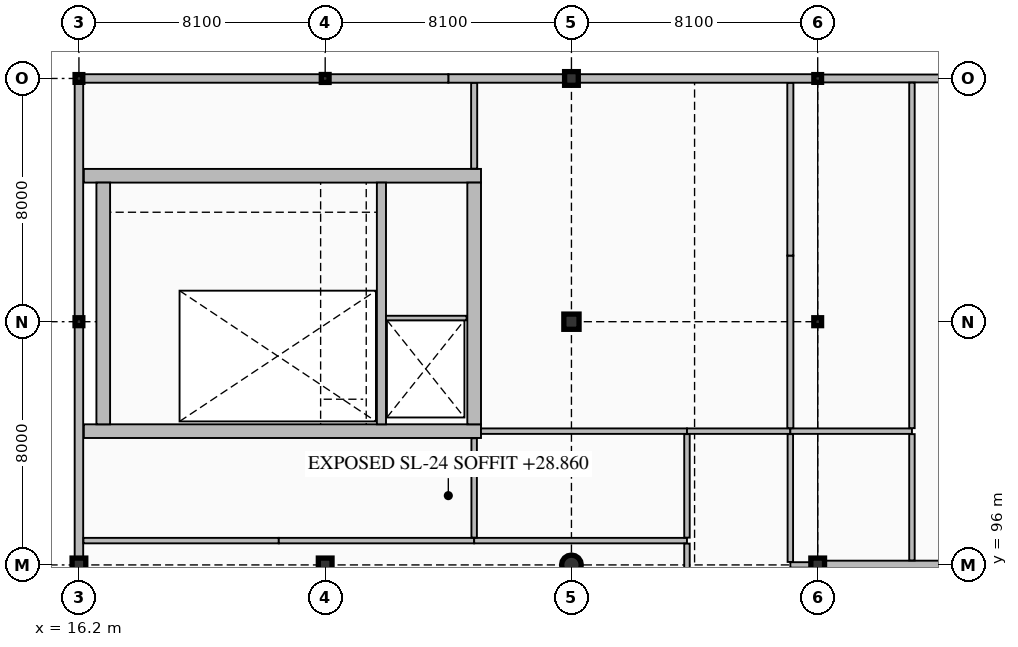
"""IFC4 building model, lengths in metres.
Left out: names, types, materials, properties, quantities, classifications, styles, units other than length and angle.
Written with IfcOpenShell. Run it as: python <this file> out.ifc"""

import sys

from ifc_helpers import new_model, si_unit, direction, frame, frame_2d, origin, origin_2d, place, context, subcontext, project, spatial, rectangle, hollow_rectangle, circle, i_section, extrude, element, fill, save


model = new_model("IFC4")
c1 = context("Model", 3, precision=1e-05, world=origin(), true_north=direction((0.0, 1.0)))
c2 = subcontext(c1, "Body", "Model", "MODEL_VIEW")
j1 = project(units=[si_unit("LENGTHUNIT", "METRE"), si_unit("PLANEANGLEUNIT", "RADIAN")], contexts=[c1])
p1 = place(None, origin())
s1 = spatial("IfcSite", under=j1, at=p1, CompositionType="ELEMENT")
p2 = place(p1, origin())
s2 = spatial("IfcBuilding", under=s1, at=p2, CompositionType="ELEMENT")
p3 = place(p2, frame((0.0, 0.0, 24.9)))
s3 = spatial("IfcBuildingStorey", under=s2, at=p3, CompositionType="ELEMENT", Elevation=24.9)
p4 = place(p3, frame((16.36, 100.4, 0.0), z_axis=(0.0, 0.0, 1.0), x_axis=(1.0, 0.0, 0.0)))
e1 = element("IfcWall", 1, at=p4, inside=s3, PredefinedType="SHEAR", context=c2, shape_type="SweptSolid", body=[
    extrude(rectangle(XDim=13.065, YDim=0.45, at=frame_2d((6.532, 0.0))), origin(), (0.0, 0.0, 1.0), 4.2),
])
p5 = place(p4, frame((1.39, 0.0, 0.0)))
e2 = element("IfcOpeningElement", 2, at=p5, cuts=e1, PredefinedType="OPENING", context=c2, shape_type="SweptSolid", body=[
    extrude(rectangle(XDim=1.15, YDim=2.25, at=frame_2d((0.575, 1.125))), frame((0.0, 0.235, 0.0), z_axis=(0.0, -1.0, 0.0), x_axis=(1.0, 0.0, 0.0)), (0.0, 0.0, 1.0), 0.47),
])
p6 = place(p4, frame((10.695, 0.0, 0.0)))
e3 = element("IfcOpeningElement", 3, at=p6, cuts=e1, PredefinedType="OPENING", context=c2, shape_type="SweptSolid", body=[
    extrude(rectangle(XDim=1.1, YDim=2.2, at=frame_2d((0.55, 1.1))), frame((0.0, 0.235, 0.0), z_axis=(0.0, -1.0, 0.0), x_axis=(1.0, 0.0, 0.0)), (0.0, 0.0, 1.0), 0.47),
])
p7 = place(p3, frame((16.36, 108.8, 0.0), z_axis=(0.0, 0.0, 1.0), x_axis=(1.0, 0.0, 0.0)))
e4 = element("IfcWall", 4, at=p7, inside=s3, PredefinedType="SHEAR", context=c2, shape_type="SweptSolid", body=[
    extrude(rectangle(XDim=13.065, YDim=0.45, at=frame_2d((6.532, 0.0))), origin(), (0.0, 0.0, 1.0), 4.2),
])
for number, where, z_axis, x_axis in (
    (5, (17.0, 100.625, 0.0), (0.0, 0.0, 1.0), (0.0, 1.0, 0.0)),
    (6, (29.2, 100.625, 0.0), (0.0, 0.0, 1.0), (0.0, 1.0, 0.0)),
):
    element("IfcWall", number, at=place(p3, frame(where, z_axis=z_axis, x_axis=x_axis)), inside=s3, PredefinedType="SHEAR", context=c2, shape_type="SweptSolid", body=[
        extrude(rectangle(XDim=7.95, YDim=0.45, at=frame_2d((3.975, 0.0))), origin(), (0.0, 0.0, 1.0), 4.2),
    ])
p8 = place(p3, frame((26.15, 100.625, 0.0), z_axis=(0.0, 0.0, 1.0), x_axis=(0.0, 1.0, 0.0)))
e7 = element("IfcWall", 7, at=p8, inside=s3, PredefinedType="SHEAR", context=c2, shape_type="SweptSolid", body=[
    extrude(rectangle(XDim=7.95, YDim=0.3, at=frame_2d((3.975, 0.0))), origin(), (0.0, 0.0, 1.0), 4.2),
])
p9 = place(p3, frame((16.2, 96.0, 0.0), z_axis=(0.0, 0.0, 1.0), x_axis=(1.0, 0.0, 0.0)))
e8 = element("IfcColumn", 8, at=p9, inside=s3, PredefinedType="COLUMN", context=c2, shape_type="SweptSolid", body=[
    extrude(rectangle(XDim=0.45, YDim=0.45, at=origin_2d()), origin(), (0.0, 0.0, 1.0), 4.2),
])
p10 = place(p3, frame((16.2, 104.0, 0.0), z_axis=(0.0, 0.0, 1.0), x_axis=(1.0, 0.0, 0.0)))
e9 = element("IfcColumn", 9, at=p10, inside=s3, PredefinedType="COLUMN", context=c2, shape_type="SweptSolid", body=[
    extrude(i_section(OverallWidth=0.256, OverallDepth=0.26, WebThickness=0.011, FlangeThickness=0.017, FilletRadius=0.013, at=origin_2d()), origin(), (0.0, 0.0, 1.0), 4.2),
])
p11 = place(p3, frame((16.2, 112.0, 0.0), z_axis=(0.0, 0.0, 1.0), x_axis=(1.0, 0.0, 0.0)))
e10 = element("IfcColumn", 10, at=p11, inside=s3, PredefinedType="COLUMN", context=c2, shape_type="SweptSolid", body=[
    extrude(hollow_rectangle(XDim=0.254, YDim=0.254, WallThickness=0.013, InnerFilletRadius=0.013, OuterFilletRadius=0.025, at=origin_2d()), origin(), (0.0, 0.0, 1.0), 4.2),
])
p12 = place(p3, frame((24.3, 96.0, 0.0), z_axis=(0.0, 0.0, 1.0), x_axis=(1.0, 0.0, 0.0)))
e11 = element("IfcColumn", 11, at=p12, inside=s3, PredefinedType="COLUMN", context=c2, shape_type="SweptSolid", body=[
    extrude(rectangle(XDim=0.45, YDim=0.45, at=origin_2d()), origin(), (0.0, 0.0, 1.0), 4.2),
])
p13 = place(p3, frame((24.3, 112.0, 0.0), z_axis=(0.0, 0.0, 1.0), x_axis=(1.0, 0.0, 0.0)))
e12 = element("IfcColumn", 12, at=p13, inside=s3, PredefinedType="COLUMN", context=c2, shape_type="SweptSolid", body=[
    extrude(i_section(OverallWidth=0.256, OverallDepth=0.26, WebThickness=0.011, FlangeThickness=0.017, FilletRadius=0.013, at=origin_2d()), origin(), (0.0, 0.0, 1.0), 4.2),
])
p14 = place(p3, frame((32.4, 96.0, 0.0), z_axis=(0.0, 0.0, 1.0), x_axis=(1.0, 0.0, 0.0)))
e13 = element("IfcColumn", 13, at=p14, inside=s3, PredefinedType="COLUMN", context=c2, shape_type="SweptSolid", body=[
    extrude(circle(Radius=0.325, at=origin_2d()), origin(), (0.0, 0.0, 1.0), 4.2),
])
p15 = place(p3, frame((32.4, 104.0, 0.0), z_axis=(0.0, 0.0, 1.0), x_axis=(1.0, 0.0, 0.0)))
e14 = element("IfcColumn", 14, at=p15, inside=s3, PredefinedType="COLUMN", context=c2, shape_type="SweptSolid", body=[
    extrude(rectangle(XDim=0.5, YDim=0.5, at=origin_2d()), origin(), (0.0, 0.0, 1.0), 4.2),
])
for number, where, z_axis, x_axis in (
    (15, (32.4, 112.0, 0.0), (0.0, 0.0, 1.0), (1.0, 0.0, 0.0)),
    (16, (40.5, 96.0, 0.0), (0.0, 0.0, 1.0), (1.0, 0.0, 0.0)),
):
    element("IfcColumn", number, at=place(p3, frame(where, z_axis=z_axis, x_axis=x_axis)), inside=s3, PredefinedType="COLUMN", context=c2, shape_type="SweptSolid", body=[
        extrude(rectangle(XDim=0.45, YDim=0.45, at=origin_2d()), origin(), (0.0, 0.0, 1.0), 4.2),
    ])
p16 = place(p3, frame((40.5, 104.0, 0.0), z_axis=(0.0, 0.0, 1.0), x_axis=(1.0, 0.0, 0.0)))
e17 = element("IfcColumn", 17, at=p16, inside=s3, PredefinedType="COLUMN", context=c2, shape_type="SweptSolid", body=[
    extrude(i_section(OverallWidth=0.256, OverallDepth=0.26, WebThickness=0.011, FlangeThickness=0.017, FilletRadius=0.013, at=origin_2d()), origin(), (0.0, 0.0, 1.0), 4.2),
])
p17 = place(p3, frame((40.5, 112.0, 0.0), z_axis=(0.0, 0.0, 1.0), x_axis=(1.0, 0.0, 0.0)))
e18 = element("IfcColumn", 18, at=p17, inside=s3, PredefinedType="COLUMN", context=c2, shape_type="SweptSolid", body=[
    extrude(hollow_rectangle(XDim=0.254, YDim=0.254, WallThickness=0.013, InnerFilletRadius=0.013, OuterFilletRadius=0.025, at=origin_2d()), origin(), (0.0, 0.0, 1.0), 4.2),
])
p18 = place(p3, frame((40.68, 96.0, 0.0), z_axis=(0.0, 0.0, 1.0), x_axis=(1.0, 0.0, 0.0)))
e19 = element("IfcWall", 19, at=p18, inside=s3, PredefinedType="SOLIDWALL", context=c2, shape_type="SweptSolid", body=[
    extrude(rectangle(XDim=5.52, YDim=0.28, at=frame_2d((2.76, 0.0))), origin(), (0.0, 0.0, 1.0), 3.402),
])
p19 = place(p3, frame((46.2, 112.0, 0.0), z_axis=(0.0, 0.0, 1.0), x_axis=(-1.0, 0.0, 0.0)))
e20 = element("IfcWall", 20, at=p19, inside=s3, PredefinedType="SOLIDWALL", context=c2, shape_type="SweptSolid", body=[
    extrude(rectangle(XDim=5.7, YDim=0.26, at=frame_2d((2.85, 0.0))), origin(), (0.0, 0.0, 1.0), 3.489),
])
p20 = place(p19, frame((3.6, 0.0, 0.95)))
e21 = element("IfcOpeningElement", 21, at=p20, cuts=e20, PredefinedType="OPENING", context=c2, shape_type="SweptSolid", body=[
    extrude(rectangle(XDim=0.6, YDim=1.8, at=frame_2d((0.3, 0.9))), frame((0.0, 0.14, 0.0), z_axis=(0.0, -1.0, 0.0), x_axis=(1.0, 0.0, 0.0)), (0.0, 0.0, 1.0), 0.28),
])
p21 = place(p3, frame((40.5, 112.0, 0.0), z_axis=(0.0, 0.0, 1.0), x_axis=(-1.0, 0.0, 0.0)))
e22 = element("IfcWall", 22, at=p21, inside=s3, PredefinedType="SOLIDWALL", context=c2, shape_type="SweptSolid", body=[
    extrude(rectangle(XDim=12.15, YDim=0.28, at=frame_2d((6.075, 0.0))), origin(), (0.0, 0.0, 1.0), 3.402),
])
p22 = place(p21, frame((5.85, 0.0, 0.85)))
e23 = element("IfcOpeningElement", 23, at=p22, cuts=e22, PredefinedType="OPENING", context=c2, shape_type="SweptSolid", body=[
    extrude(rectangle(XDim=0.75, YDim=2.2, at=frame_2d((0.375, 1.1))), frame((0.0, 0.15, 0.0), z_axis=(0.0, -1.0, 0.0), x_axis=(1.0, 0.0, 0.0)), (0.0, 0.0, 1.0), 0.3),
])
p23 = place(p3, frame((28.35, 112.0, 0.0), z_axis=(0.0, 0.0, 1.0), x_axis=(-1.0, 0.0, 0.0)))
e24 = element("IfcWall", 24, at=p23, inside=s3, PredefinedType="SOLIDWALL", context=c2, shape_type="SweptSolid", body=[
    extrude(rectangle(XDim=12.15, YDim=0.28, at=frame_2d((6.075, 0.0))), origin(), (0.0, 0.0, 1.0), 3.402),
])
p24 = place(p23, frame((6.75, 0.0, 0.95)))
e25 = element("IfcOpeningElement", 25, at=p24, cuts=e24, PredefinedType="OPENING", context=c2, shape_type="SweptSolid", body=[
    extrude(rectangle(XDim=2.7, YDim=0.9, at=frame_2d((1.35, 0.45))), frame((0.0, 0.15, 0.0), z_axis=(0.0, -1.0, 0.0), x_axis=(1.0, 0.0, 0.0)), (0.0, 0.0, 1.0), 0.3),
])
p25 = place(p3, frame((16.2, 112.0, 0.0), z_axis=(0.0, 0.0, 1.0), x_axis=(0.0, -1.0, 0.0)))
e26 = element("IfcWall", 26, at=p25, inside=s3, PredefinedType="SOLIDWALL", context=c2, shape_type="SweptSolid", body=[
    extrude(rectangle(XDim=16.0, YDim=0.28, at=frame_2d((8.0, 0.0))), origin(), (0.0, 0.0, 1.0), 3.452),
])
p26 = place(p3, frame((16.2, 96.0, 0.0), z_axis=(0.0, 0.0, 1.0), x_axis=(0.0, -1.0, 0.0)))
e27 = element("IfcWall", 27, at=p26, inside=s3, PredefinedType="SOLIDWALL", context=c2, shape_type="SweptSolid", body=[
    extrude(rectangle(XDim=16.0, YDim=0.28, at=frame_2d((8.0, 0.0))), origin(), (0.0, 0.0, 1.0), 3.489),
])
p27 = place(p3, frame((26.3, 104.12, 0.0), z_axis=(0.0, 0.0, 1.0), x_axis=(1.0, 0.0, 0.0)))
e28 = element("IfcWall", 28, at=p27, inside=s3, PredefinedType="PARTITIONING", context=c2, shape_type="SweptSolid", body=[
    extrude(rectangle(XDim=2.65, YDim=0.15, at=frame_2d((1.325, 0.0))), origin(), (0.0, 0.0, 1.0), 3.96),
])
for number, where, z_axis, x_axis in (
    (29, (16.348, 96.8, 0.0), (0.0, 0.0, 1.0), (1.0, 0.0, 0.0)),
    (30, (22.774, 96.8, 0.0), (0.0, 0.0, 1.0), (1.0, 0.0, 0.0)),
):
    element("IfcWall", number, at=place(p3, frame(where, z_axis=z_axis, x_axis=x_axis)), inside=s3, PredefinedType="PARTITIONING", context=c2, shape_type="SweptSolid", body=[
        extrude(rectangle(XDim=6.426, YDim=0.18, at=frame_2d((3.213, 0.0))), origin(), (0.0, 0.0, 1.0), 3.96),
    ])
p28 = place(p3, frame((29.2, 96.8, 0.0), z_axis=(0.0, 0.0, 1.0), x_axis=(1.0, 0.0, 0.0)))
e31 = element("IfcWall", 31, at=p28, inside=s3, PredefinedType="PARTITIONING", context=c2, shape_type="SweptSolid", body=[
    extrude(rectangle(XDim=7.0, YDim=0.18, at=frame_2d((3.5, 0.0))), origin(), (0.0, 0.0, 1.0), 3.96),
])
p29 = place(p3, frame((29.425, 100.4, 0.0), z_axis=(0.0, 0.0, 1.0), x_axis=(1.0, 0.0, 0.0)))
e32 = element("IfcWall", 32, at=p29, inside=s3, PredefinedType="PARTITIONING", context=c2, shape_type="SweptSolid", body=[
    extrude(rectangle(XDim=6.775, YDim=0.18, at=frame_2d((3.387, 0.0))), origin(), (0.0, 0.0, 1.0), 3.96),
])
p30 = place(p29, frame((2.913, 0.0, 0.0)))
e33 = element("IfcOpeningElement", 33, at=p30, cuts=e32, PredefinedType="OPENING", context=c2, shape_type="SweptSolid", body=[
    extrude(rectangle(XDim=0.95, YDim=2.15, at=frame_2d((0.475, 1.075))), frame((0.0, 0.1, 0.0), z_axis=(0.0, -1.0, 0.0), x_axis=(1.0, 0.0, 0.0)), (0.0, 0.0, 1.0), 0.2),
])
p31 = place(p3, frame((36.2, 100.4, 0.0), z_axis=(0.0, 0.0, 1.0), x_axis=(1.0, 0.0, 0.0)))
e34 = element("IfcWall", 34, at=p31, inside=s3, PredefinedType="PARTITIONING", context=c2, shape_type="SweptSolid", body=[
    extrude(rectangle(XDim=3.4, YDim=0.18, at=frame_2d((1.7, 0.0))), origin(), (0.0, 0.0, 1.0), 3.96),
])
p32 = place(p3, frame((39.6, 96.0, 0.0), z_axis=(0.0, 0.0, 1.0), x_axis=(1.0, 0.0, 0.0)))
e35 = element("IfcWall", 35, at=p32, inside=s3, PredefinedType="PARTITIONING", context=c2, shape_type="SweptSolid", body=[
    extrude(rectangle(XDim=0.667, YDim=0.18, at=frame_2d((0.333, 0.0))), origin(), (0.0, 0.0, 1.0), 3.489),
])
p33 = place(p3, frame((39.6, 100.4, 0.0), z_axis=(0.0, 0.0, 1.0), x_axis=(1.0, 0.0, 0.0)))
e36 = element("IfcWall", 36, at=p33, inside=s3, PredefinedType="PARTITIONING", context=c2, shape_type="SweptSolid", body=[
    extrude(rectangle(XDim=4.0, YDim=0.18, at=frame_2d((2.0, 0.0))), origin(), (0.0, 0.0, 1.0), 3.96),
])
p34 = place(p3, frame((29.2, 96.898, 0.0), z_axis=(0.0, 0.0, 1.0), x_axis=(0.0, 1.0, 0.0)))
e37 = element("IfcWall", 37, at=p34, inside=s3, PredefinedType="PARTITIONING", context=c2, shape_type="SweptSolid", body=[
    extrude(rectangle(XDim=3.269, YDim=0.18, at=frame_2d((1.635, 0.0))), origin(), (0.0, 0.0, 1.0), 3.96),
])
p35 = place(p34, frame((1.034, 0.0, 0.0)))
e38 = element("IfcOpeningElement", 38, at=p35, cuts=e37, PredefinedType="OPENING", context=c2, shape_type="SweptSolid", body=[
    extrude(rectangle(XDim=1.2, YDim=2.2, at=frame_2d((0.6, 1.1))), frame((0.0, 0.1, 0.0), z_axis=(0.0, -1.0, 0.0), x_axis=(1.0, 0.0, 0.0)), (0.0, 0.0, 1.0), 0.2),
])
p36 = place(p3, frame((29.2, 109.033, 0.0), z_axis=(0.0, 0.0, 1.0), x_axis=(0.0, 1.0, 0.0)))
e39 = element("IfcWall", 39, at=p36, inside=s3, PredefinedType="PARTITIONING", context=c2, shape_type="SweptSolid", body=[
    extrude(rectangle(XDim=2.819, YDim=0.2, at=frame_2d((1.41, 0.0))), origin(), (0.0, 0.0, 1.0), 3.96),
])
p37 = place(p36, frame((0.909, 0.0, 0.0)))
e40 = element("IfcOpeningElement", 40, at=p37, cuts=e39, PredefinedType="OPENING", context=c2, shape_type="SweptSolid", body=[
    extrude(rectangle(XDim=1.0, YDim=2.2, at=frame_2d((0.5, 1.1))), frame((0.0, 0.11, 0.0), z_axis=(0.0, -1.0, 0.0), x_axis=(1.0, 0.0, 0.0)), (0.0, 0.0, 1.0), 0.22),
])
p38 = place(p3, frame((36.2, 82.608, 0.0), z_axis=(0.0, 0.0, 1.0), x_axis=(0.0, 1.0, 0.0)))
e41 = element("IfcWall", 41, at=p38, inside=s3, PredefinedType="PARTITIONING", context=c2, shape_type="SweptSolid", body=[
    extrude(rectangle(XDim=14.094, YDim=0.18, at=frame_2d((7.047, 0.0))), origin(), (0.0, 0.0, 1.0), 3.605),
])
p39 = place(p38, frame((6.547, 0.0, 0.0)))
e42 = element("IfcOpeningElement", 42, at=p39, cuts=e41, PredefinedType="OPENING", context=c2, shape_type="SweptSolid", body=[
    extrude(rectangle(XDim=1.0, YDim=2.2, at=frame_2d((0.5, 1.1))), frame((0.0, 0.1, 0.0), z_axis=(0.0, -1.0, 0.0), x_axis=(1.0, 0.0, 0.0)), (0.0, 0.0, 1.0), 0.2),
])
p40 = place(p3, frame((36.2, 96.898, 0.0), z_axis=(0.0, 0.0, 1.0), x_axis=(0.0, 1.0, 0.0)))
e43 = element("IfcWall", 43, at=p40, inside=s3, PredefinedType="PARTITIONING", context=c2, shape_type="SweptSolid", body=[
    extrude(rectangle(XDim=3.404, YDim=0.18, at=frame_2d((1.702, 0.0))), origin(), (0.0, 0.0, 1.0), 3.649),
])
p41 = place(p40, frame((1.152, 0.0, 0.0)))
e44 = element("IfcOpeningElement", 44, at=p41, cuts=e43, PredefinedType="OPENING", context=c2, shape_type="SweptSolid", body=[
    extrude(rectangle(XDim=1.1, YDim=2.2, at=frame_2d((0.55, 1.1))), frame((0.0, 0.1, 0.0), z_axis=(0.0, -1.0, 0.0), x_axis=(1.0, 0.0, 0.0)), (0.0, 0.0, 1.0), 0.2),
])
p42 = place(p3, frame((39.6, 96.098, 0.0), z_axis=(0.0, 0.0, 1.0), x_axis=(0.0, 1.0, 0.0)))
e45 = element("IfcWall", 45, at=p42, inside=s3, PredefinedType="PARTITIONING", context=c2, shape_type="SweptSolid", body=[
    extrude(rectangle(XDim=4.204, YDim=0.18, at=frame_2d((2.102, 0.0))), origin(), (0.0, 0.0, 1.0), 3.96),
])
p43 = place(p42, frame((1.502, 0.0, 0.0)))
e46 = element("IfcOpeningElement", 46, at=p43, cuts=e45, PredefinedType="OPENING", context=c2, shape_type="SweptSolid", body=[
    extrude(rectangle(XDim=1.2, YDim=2.2, at=frame_2d((0.6, 1.1))), frame((0.0, 0.1, 0.0), z_axis=(0.0, -1.0, 0.0), x_axis=(1.0, 0.0, 0.0)), (0.0, 0.0, 1.0), 0.2),
])
for number, where, z_axis, x_axis in (
    (47, (39.6, 100.498, 0.0), (0.0, 0.0, 1.0), (0.0, 1.0, 0.0)),
    (48, (39.6, 106.175, 0.0), (0.0, 0.0, 1.0), (0.0, 1.0, 0.0)),
):
    element("IfcWall", number, at=place(p3, frame(where, z_axis=z_axis, x_axis=x_axis)), inside=s3, PredefinedType="PARTITIONING", context=c2, shape_type="SweptSolid", body=[
        extrude(rectangle(XDim=5.677, YDim=0.2, at=frame_2d((2.838, 0.0))), origin(), (0.0, 0.0, 1.0), 3.96),
    ])
p44 = place(p3, frame((43.6, 96.148, 0.0), z_axis=(0.0, 0.0, 1.0), x_axis=(0.0, 1.0, 0.0)))
e49 = element("IfcWall", 49, at=p44, inside=s3, PredefinedType="PARTITIONING", context=c2, shape_type="SweptSolid", body=[
    extrude(rectangle(XDim=4.154, YDim=0.18, at=frame_2d((2.077, 0.0))), origin(), (0.0, 0.0, 1.0), 3.96),
])
p45 = place(p44, frame((1.527, 0.0, 0.0)))
e50 = element("IfcOpeningElement", 50, at=p45, cuts=e49, PredefinedType="OPENING", context=c2, shape_type="SweptSolid", body=[
    extrude(rectangle(XDim=1.1, YDim=2.2, at=frame_2d((0.55, 1.1))), frame((0.0, 0.1, 0.0), z_axis=(0.0, -1.0, 0.0), x_axis=(1.0, 0.0, 0.0)), (0.0, 0.0, 1.0), 0.2),
])
p46 = place(p3, frame((43.6, 100.498, 0.0), z_axis=(0.0, 0.0, 1.0), x_axis=(0.0, 1.0, 0.0)))
e51 = element("IfcWall", 51, at=p46, inside=s3, PredefinedType="PARTITIONING", context=c2, shape_type="SweptSolid", body=[
    extrude(rectangle(XDim=11.364, YDim=0.18, at=frame_2d((5.682, 0.0))), origin(), (0.0, 0.0, 1.0), 3.96),
])
p47 = place(p46, frame((5.182, 0.0, 0.0)))
e52 = element("IfcOpeningElement", 52, at=p47, cuts=e51, PredefinedType="OPENING", context=c2, shape_type="SweptSolid", body=[
    extrude(rectangle(XDim=1.0, YDim=2.2, at=frame_2d((0.5, 1.1))), frame((0.0, 0.1, 0.0), z_axis=(0.0, -1.0, 0.0), x_axis=(1.0, 0.0, 0.0)), (0.0, 0.0, 1.0), 0.2),
])
p48 = place(p20, origin())
e53 = element("IfcWindow", 53, at=p48, inside=s3, PartitioningType="SINGLE_PANEL", PredefinedType="WINDOW", context=c2, shape_type="SweptSolid", body=[
    extrude(rectangle(XDim=0.6, YDim=1.8, at=frame_2d((0.3, 0.9))), frame((0.0, 0.03, 0.0), z_axis=(0.0, -1.0, 0.0), x_axis=(1.0, 0.0, 0.0)), (0.0, 0.0, 1.0), 0.06),
])
fill(e21, e53)
p49 = place(p22, origin())
e54 = element("IfcWindow", 54, at=p49, inside=s3, PartitioningType="SINGLE_PANEL", PredefinedType="WINDOW", context=c2, shape_type="SweptSolid", body=[
    extrude(rectangle(XDim=0.75, YDim=2.2, at=frame_2d((0.375, 1.1))), frame((0.0, 0.03, 0.0), z_axis=(0.0, -1.0, 0.0), x_axis=(1.0, 0.0, 0.0)), (0.0, 0.0, 1.0), 0.06),
])
fill(e23, e54)
p50 = place(p24, origin())
e55 = element("IfcWindow", 55, at=p50, inside=s3, PartitioningType="TRIPLE_PANEL_VERTICAL", PredefinedType="WINDOW", context=c2, shape_type="SweptSolid", body=[
    extrude(rectangle(XDim=2.7, YDim=0.9, at=frame_2d((1.35, 0.45))), frame((0.0, 0.03, 0.0), z_axis=(0.0, -1.0, 0.0), x_axis=(1.0, 0.0, 0.0)), (0.0, 0.0, 1.0), 0.06),
])
fill(e25, e55)
p51 = place(p5, origin())
e56 = element("IfcDoor", 56, at=p51, inside=s3, OperationType="SINGLE_SWING_LEFT", PredefinedType="DOOR", context=c2, shape_type="SweptSolid", body=[
    extrude(rectangle(XDim=1.15, YDim=2.25, at=frame_2d((0.575, 1.125))), frame((0.0, 0.025, 0.0), z_axis=(0.0, -1.0, 0.0), x_axis=(1.0, 0.0, 0.0)), (0.0, 0.0, 1.0), 0.05),
])
fill(e2, e56)
p52 = place(p6, frame((1.1, 0.0, 0.0), z_axis=(0.0, 0.0, 1.0), x_axis=(-1.0, 0.0, 0.0)))
e57 = element("IfcDoor", 57, at=p52, inside=s3, OperationType="DOUBLE_DOOR_SLIDING", PredefinedType="DOOR", context=c2, shape_type="SweptSolid", body=[
    extrude(rectangle(XDim=1.1, YDim=2.2, at=frame_2d((0.55, 1.1))), frame((0.0, 0.025, 0.0), z_axis=(0.0, -1.0, 0.0), x_axis=(1.0, 0.0, 0.0)), (0.0, 0.0, 1.0), 0.05),
])
fill(e3, e57)
p53 = place(p30, origin())
e58 = element("IfcDoor", 58, at=p53, inside=s3, OperationType="SINGLE_SWING_LEFT", PredefinedType="DOOR", context=c2, shape_type="SweptSolid", body=[
    extrude(rectangle(XDim=0.95, YDim=2.15, at=frame_2d((0.475, 1.075))), frame((0.0, 0.025, 0.0), z_axis=(0.0, -1.0, 0.0), x_axis=(1.0, 0.0, 0.0)), (0.0, 0.0, 1.0), 0.05),
])
fill(e33, e58)
p54 = place(p35, frame((1.2, 0.0, 0.0), z_axis=(0.0, 0.0, 1.0), x_axis=(-1.0, 0.0, 0.0)))
e59 = element("IfcDoor", 59, at=p54, inside=s3, OperationType="SINGLE_SWING_LEFT", PredefinedType="DOOR", context=c2, shape_type="SweptSolid", body=[
    extrude(rectangle(XDim=1.2, YDim=2.2, at=frame_2d((0.6, 1.1))), frame((0.0, 0.025, 0.0), z_axis=(0.0, -1.0, 0.0), x_axis=(1.0, 0.0, 0.0)), (0.0, 0.0, 1.0), 0.05),
])
fill(e38, e59)
p55 = place(p37, origin())
e60 = element("IfcDoor", 60, at=p55, inside=s3, OperationType="SINGLE_SWING_RIGHT", PredefinedType="DOOR", context=c2, shape_type="SweptSolid", body=[
    extrude(rectangle(XDim=1.0, YDim=2.2, at=frame_2d((0.5, 1.1))), frame((0.0, 0.025, 0.0), z_axis=(0.0, -1.0, 0.0), x_axis=(1.0, 0.0, 0.0)), (0.0, 0.0, 1.0), 0.05),
])
fill(e40, e60)
p56 = place(p41, origin())
e61 = element("IfcDoor", 61, at=p56, inside=s3, OperationType="SINGLE_SWING_RIGHT", PredefinedType="DOOR", context=c2, shape_type="SweptSolid", body=[
    extrude(rectangle(XDim=1.1, YDim=2.2, at=frame_2d((0.55, 1.1))), frame((0.0, 0.025, 0.0), z_axis=(0.0, -1.0, 0.0), x_axis=(1.0, 0.0, 0.0)), (0.0, 0.0, 1.0), 0.05),
])
fill(e44, e61)
p57 = place(p43, frame((1.2, 0.0, 0.0), z_axis=(0.0, 0.0, 1.0), x_axis=(-1.0, 0.0, 0.0)))
e62 = element("IfcDoor", 62, at=p57, inside=s3, OperationType="SINGLE_SWING_LEFT", PredefinedType="DOOR", context=c2, shape_type="SweptSolid", body=[
    extrude(rectangle(XDim=1.2, YDim=2.2, at=frame_2d((0.6, 1.1))), frame((0.0, 0.025, 0.0), z_axis=(0.0, -1.0, 0.0), x_axis=(1.0, 0.0, 0.0)), (0.0, 0.0, 1.0), 0.05),
])
fill(e46, e62)
p58 = place(p45, origin())
e63 = element("IfcDoor", 63, at=p58, inside=s3, OperationType="SINGLE_SWING_RIGHT", PredefinedType="DOOR", context=c2, shape_type="SweptSolid", body=[
    extrude(rectangle(XDim=1.1, YDim=2.2, at=frame_2d((0.55, 1.1))), frame((0.0, 0.025, 0.0), z_axis=(0.0, -1.0, 0.0), x_axis=(1.0, 0.0, 0.0)), (0.0, 0.0, 1.0), 0.05),
])
fill(e50, e63)
p59 = place(p47, origin())
e64 = element("IfcDoor", 64, at=p59, inside=s3, OperationType="SINGLE_SWING_LEFT", PredefinedType="DOOR", context=c2, shape_type="SweptSolid", body=[
    extrude(rectangle(XDim=1.0, YDim=2.2, at=frame_2d((0.5, 1.1))), frame((0.0, 0.025, 0.0), z_axis=(0.0, -1.0, 0.0), x_axis=(1.0, 0.0, 0.0)), (0.0, 0.0, 1.0), 0.05),
])
fill(e52, e64)
save(model, sys.argv[1])
